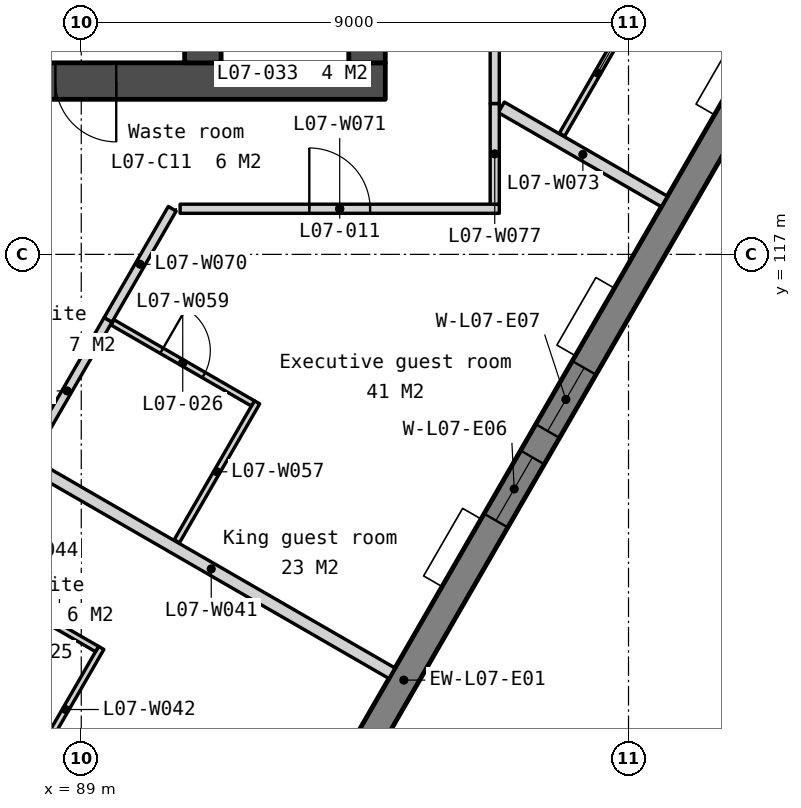
"""IFC4 building model, lengths in metres.
Left out: names, types, materials, properties, quantities, classifications, styles, units other than length and angle.
Written with IfcOpenShell. Run it as: python <this file> out.ifc"""

import sys

from ifc_helpers import new_model, si_unit, direction, frame, frame_2d, origin, place, context, subcontext, project, spatial, polyline, rectangle, outline, extrude, element, fill, save


model = new_model("IFC4")
c1 = context("Model", 3, precision=1e-05, world=origin(), true_north=direction((0.0, 1.0)))
c2 = subcontext(c1, "Body", "Model", "MODEL_VIEW")
j1 = project(units=[si_unit("LENGTHUNIT", "METRE"), si_unit("PLANEANGLEUNIT", "RADIAN")], contexts=[c1])
p1 = place(None, origin())
s1 = spatial("IfcSite", under=j1, at=p1, CompositionType="ELEMENT")
p2 = place(p1, origin())
s2 = spatial("IfcBuilding", under=s1, at=p2, CompositionType="ELEMENT")
p3 = place(p2, frame((0.0, 0.0, 38.5)))
s3 = spatial("IfcBuildingStorey", under=s2, at=p3, CompositionType="ELEMENT", Elevation=38.5)
p4 = place(p3, frame((66.0, 119.85, 0.0), z_axis=(0.0, 0.0, 1.0), x_axis=(1.0, 0.0, 0.0)))
e1 = element("IfcWall", 1, at=p4, inside=s3, PredefinedType="SOLIDWALL", context=c2, shape_type="SweptSolid", body=[
    extrude(rectangle(XDim=28.0, YDim=0.6, at=frame_2d((14.0, 0.0))), origin(), (0.0, 0.0, 1.0), 3.35),
])
p5 = place(p4, frame((6.825, 0.0, 0.0)))
e2 = element("IfcOpeningElement", 2, at=p5, cuts=e1, PredefinedType="OPENING", context=c2, shape_type="SweptSolid", body=[
    extrude(rectangle(XDim=1.8, YDim=2.1, at=frame_2d((0.9, 1.05))), frame((0.0, 0.31, 0.0), z_axis=(0.0, -1.0, 0.0), x_axis=(1.0, 0.0, 0.0)), (0.0, 0.0, 1.0), 0.62),
])
p6 = place(p4, frame((15.85, 0.0, 0.0)))
e3 = element("IfcOpeningElement", 3, at=p6, cuts=e1, PredefinedType="OPENING", context=c2, shape_type="SweptSolid", body=[
    extrude(rectangle(XDim=1.5, YDim=2.1, at=frame_2d((0.75, 1.05))), frame((0.0, 0.31, 0.0), z_axis=(0.0, -1.0, 0.0), x_axis=(1.0, 0.0, 0.0)), (0.0, 0.0, 1.0), 0.62),
])
p7 = place(p4, frame((19.375, 0.0, 0.0)))
e4 = element("IfcOpeningElement", 4, at=p7, cuts=e1, PredefinedType="OPENING", context=c2, shape_type="SweptSolid", body=[
    extrude(rectangle(XDim=1.8, YDim=2.1, at=frame_2d((0.9, 1.05))), frame((0.0, 0.31, 0.0), z_axis=(0.0, -1.0, 0.0), x_axis=(1.0, 0.0, 0.0)), (0.0, 0.0, 1.0), 0.62),
])
p8 = place(p4, frame((4.425, 0.0, 0.0)))
e5 = element("IfcOpeningElement", 5, at=p8, cuts=e1, PredefinedType="OPENING", context=c2, shape_type="SweptSolid", body=[
    extrude(rectangle(XDim=1.0, YDim=2.1, at=frame_2d((0.5, 1.05))), frame((0.0, 0.31, 0.0), z_axis=(0.0, -1.0, 0.0), x_axis=(1.0, 0.0, 0.0)), (0.0, 0.0, 1.0), 0.62),
])
p9 = place(p4, frame((9.783, 0.0, 0.0)))
e6 = element("IfcOpeningElement", 6, at=p9, cuts=e1, PredefinedType="OPENING", context=c2, shape_type="SweptSolid", body=[
    extrude(rectangle(XDim=1.0, YDim=2.1, at=frame_2d((0.5, 1.05))), frame((0.0, 0.31, 0.0), z_axis=(0.0, -1.0, 0.0), x_axis=(1.0, 0.0, 0.0)), (0.0, 0.0, 1.0), 0.62),
])
p10 = place(p4, frame((11.525, 0.0, 0.0)))
e7 = element("IfcOpeningElement", 7, at=p10, cuts=e1, PredefinedType="OPENING", context=c2, shape_type="SweptSolid", body=[
    extrude(rectangle(XDim=1.0, YDim=2.1, at=frame_2d((0.5, 1.05))), frame((0.0, 0.31, 0.0), z_axis=(0.0, -1.0, 0.0), x_axis=(1.0, 0.0, 0.0)), (0.0, 0.0, 1.0), 0.62),
])
p11 = place(p4, frame((13.658, 0.0, 0.0)))
e8 = element("IfcOpeningElement", 8, at=p11, cuts=e1, PredefinedType="OPENING", context=c2, shape_type="SweptSolid", body=[
    extrude(rectangle(XDim=1.0, YDim=2.1, at=frame_2d((0.5, 1.05))), frame((0.0, 0.31, 0.0), z_axis=(0.0, -1.0, 0.0), x_axis=(1.0, 0.0, 0.0)), (0.0, 0.0, 1.0), 0.62),
])
p12 = place(p4, frame((22.575, 0.0, 0.0)))
e9 = element("IfcOpeningElement", 9, at=p12, cuts=e1, PredefinedType="OPENING", context=c2, shape_type="SweptSolid", body=[
    extrude(rectangle(XDim=1.0, YDim=2.1, at=frame_2d((0.5, 1.05))), frame((0.0, 0.31, 0.0), z_axis=(0.0, -1.0, 0.0), x_axis=(1.0, 0.0, 0.0)), (0.0, 0.0, 1.0), 0.62),
])
p13 = place(p3, frame((91.0, 122.25, 0.0), z_axis=(0.0, 0.0, 1.0), x_axis=(0.0, -1.0, 0.0)))
e10 = element("IfcWall", 10, at=p13, inside=s3, PredefinedType="SOLIDWALL", context=c2, shape_type="SweptSolid", body=[
    extrude(rectangle(XDim=2.1, YDim=0.6, at=frame_2d((1.05, 0.0))), origin(), (0.0, 0.0, 1.0), 3.35),
])
p14 = place(p3, frame((93.7, 133.95, 0.0), z_axis=(0.0, 0.0, 1.0), x_axis=(0.0, -1.0, 0.0)))
e11 = element("IfcWall", 11, at=p14, inside=s3, PredefinedType="SOLIDWALL", context=c2, shape_type="SweptSolid", body=[
    extrude(rectangle(XDim=13.8, YDim=0.6, at=frame_2d((6.9, 0.0))), origin(), (0.0, 0.0, 1.0), 3.35),
])
p15 = place(p14, frame((0.6, 0.0, 0.0)))
e12 = element("IfcOpeningElement", 12, at=p15, cuts=e11, PredefinedType="OPENING", context=c2, shape_type="SweptSolid", body=[
    extrude(rectangle(XDim=1.1, YDim=2.1, at=frame_2d((0.55, 1.05))), frame((0.0, 0.31, 0.0), z_axis=(0.0, -1.0, 0.0), x_axis=(1.0, 0.0, 0.0)), (0.0, 0.0, 1.0), 0.62),
])
p16 = place(p14, frame((8.963, 0.0, 0.0)))
e13 = element("IfcOpeningElement", 13, at=p16, cuts=e11, PredefinedType="OPENING", context=c2, shape_type="SweptSolid", body=[
    extrude(rectangle(XDim=1.0, YDim=2.1, at=frame_2d((0.5, 1.05))), frame((0.0, 0.31, 0.0), z_axis=(0.0, -1.0, 0.0), x_axis=(1.0, 0.0, 0.0)), (0.0, 0.0, 1.0), 0.62),
])
p17 = place(p14, frame((11.888, 0.0, 0.0)))
e14 = element("IfcOpeningElement", 14, at=p17, cuts=e11, PredefinedType="OPENING", context=c2, shape_type="SweptSolid", body=[
    extrude(rectangle(XDim=1.0, YDim=2.1, at=frame_2d((0.5, 1.05))), frame((0.0, 0.31, 0.0), z_axis=(0.0, -1.0, 0.0), x_axis=(1.0, 0.0, 0.0)), (0.0, 0.0, 1.0), 0.62),
])
p18 = place(p3, frame((83.105, 90.599, -0.15), z_axis=(0.0, 0.0, 1.0), x_axis=(0.499999201451, 0.866025864826, 0.0)))
e15 = element("IfcWall", 15, at=p18, inside=s3, PredefinedType="SOLIDWALL", context=c2, shape_type="SweptSolid", body=[
    extrude(outline(polyline([(44.8, 0.0), (44.8, 3.5), (0.0, 3.5), (0.0, 0.0), (44.8, 0.0)])), frame((0.0, 0.225, 0.0), z_axis=(0.0, -1.0, 0.0), x_axis=(1.0, 0.0, 0.0)), (0.0, 0.0, 1.0), 0.45),
])
p19 = place(p18, frame((0.722, 0.0, 1.05)))
e16 = element("IfcOpeningElement", 16, at=p19, cuts=e15, PredefinedType="OPENING", context=c2, shape_type="SweptSolid", body=[
    extrude(rectangle(XDim=1.2, YDim=1.5, at=frame_2d((0.6, 0.75))), frame((0.0, 0.235, 0.0), z_axis=(0.0, -1.0, 0.0), x_axis=(1.0, 0.0, 0.0)), (0.0, 0.0, 1.0), 0.47),
])
p20 = place(p18, frame((7.51, 0.0, 1.05)))
e17 = element("IfcOpeningElement", 17, at=p20, cuts=e15, PredefinedType="OPENING", context=c2, shape_type="SweptSolid", body=[
    extrude(rectangle(XDim=1.2, YDim=1.5, at=frame_2d((0.6, 0.75))), frame((0.0, 0.235, 0.0), z_axis=(0.0, -1.0, 0.0), x_axis=(1.0, 0.0, 0.0)), (0.0, 0.0, 1.0), 0.47),
])
p21 = place(p18, frame((9.21, 0.0, 1.05)))
e18 = element("IfcOpeningElement", 18, at=p21, cuts=e15, PredefinedType="OPENING", context=c2, shape_type="SweptSolid", body=[
    extrude(rectangle(XDim=1.2, YDim=1.5, at=frame_2d((0.6, 0.75))), frame((0.0, 0.235, 0.0), z_axis=(0.0, -1.0, 0.0), x_axis=(1.0, 0.0, 0.0)), (0.0, 0.0, 1.0), 0.47),
])
p22 = place(p18, frame((16.47, 0.0, 1.05)))
e19 = element("IfcOpeningElement", 19, at=p22, cuts=e15, PredefinedType="OPENING", context=c2, shape_type="SweptSolid", body=[
    extrude(rectangle(XDim=1.2, YDim=1.5, at=frame_2d((0.6, 0.75))), frame((0.0, 0.235, 0.0), z_axis=(0.0, -1.0, 0.0), x_axis=(1.0, 0.0, 0.0)), (0.0, 0.0, 1.0), 0.47),
])
p23 = place(p18, frame((18.17, 0.0, 1.05)))
e20 = element("IfcOpeningElement", 20, at=p23, cuts=e15, PredefinedType="OPENING", context=c2, shape_type="SweptSolid", body=[
    extrude(rectangle(XDim=1.2, YDim=1.5, at=frame_2d((0.6, 0.75))), frame((0.0, 0.235, 0.0), z_axis=(0.0, -1.0, 0.0), x_axis=(1.0, 0.0, 0.0)), (0.0, 0.0, 1.0), 0.47),
])
p24 = place(p18, frame((25.43, 0.0, 1.05)))
e21 = element("IfcOpeningElement", 21, at=p24, cuts=e15, PredefinedType="OPENING", context=c2, shape_type="SweptSolid", body=[
    extrude(rectangle(XDim=1.2, YDim=1.5, at=frame_2d((0.6, 0.75))), frame((0.0, 0.235, 0.0), z_axis=(0.0, -1.0, 0.0), x_axis=(1.0, 0.0, 0.0)), (0.0, 0.0, 1.0), 0.47),
])
p25 = place(p18, frame((27.13, 0.0, 1.05)))
e22 = element("IfcOpeningElement", 22, at=p25, cuts=e15, PredefinedType="OPENING", context=c2, shape_type="SweptSolid", body=[
    extrude(rectangle(XDim=1.2, YDim=1.5, at=frame_2d((0.6, 0.75))), frame((0.0, 0.235, 0.0), z_axis=(0.0, -1.0, 0.0), x_axis=(1.0, 0.0, 0.0)), (0.0, 0.0, 1.0), 0.47),
])
p26 = place(p18, frame((34.39, 0.0, 1.05)))
e23 = element("IfcOpeningElement", 23, at=p26, cuts=e15, PredefinedType="OPENING", context=c2, shape_type="SweptSolid", body=[
    extrude(rectangle(XDim=1.2, YDim=1.5, at=frame_2d((0.6, 0.75))), frame((0.0, 0.235, 0.0), z_axis=(0.0, -1.0, 0.0), x_axis=(1.0, 0.0, 0.0)), (0.0, 0.0, 1.0), 0.47),
])
p27 = place(p18, frame((36.09, 0.0, 1.05)))
e24 = element("IfcOpeningElement", 24, at=p27, cuts=e15, PredefinedType="OPENING", context=c2, shape_type="SweptSolid", body=[
    extrude(rectangle(XDim=1.2, YDim=1.5, at=frame_2d((0.6, 0.75))), frame((0.0, 0.235, 0.0), z_axis=(0.0, -1.0, 0.0), x_axis=(1.0, 0.0, 0.0)), (0.0, 0.0, 1.0), 0.47),
])
p28 = place(p18, frame((42.878, 0.0, 1.05)))
e25 = element("IfcOpeningElement", 25, at=p28, cuts=e15, PredefinedType="OPENING", context=c2, shape_type="SweptSolid", body=[
    extrude(rectangle(XDim=1.2, YDim=1.5, at=frame_2d((0.6, 0.75))), frame((0.0, 0.235, 0.0), z_axis=(0.0, -1.0, 0.0), x_axis=(1.0, 0.0, 0.0)), (0.0, 0.0, 1.0), 0.47),
])
p29 = place(p3, frame((88.165, 113.543, 0.0), z_axis=(0.0, 0.0, 1.0), x_axis=(0.86603516302, -0.499983096127, 0.0)))
e26 = element("IfcWall", 26, at=p29, inside=s3, PredefinedType="PARTITIONING", context=c2, shape_type="SweptSolid", body=[
    extrude(rectangle(XDim=6.865, YDim=0.2, at=frame_2d((3.433, 0.0))), origin(), (0.0, 0.0, 1.0), 3.35),
])
p30 = place(p3, frame((88.158, 108.501, 0.0), z_axis=(0.0, 0.0, 1.0), x_axis=(0.500032503492, 0.866006637072, 0.0)))
e27 = element("IfcWall", 27, at=p30, inside=s3, PredefinedType="PARTITIONING", context=c2, shape_type="SweptSolid", body=[
    extrude(rectangle(XDim=2.34, YDim=0.1, at=frame_2d((1.17, 0.0))), origin(), (0.0, 0.0, 1.0), 3.35),
])
p31 = place(p3, frame((87.116, 111.746, 0.0), z_axis=(0.0, 0.0, 1.0), x_axis=(0.86604923931, -0.499958713387, 0.0)))
e28 = element("IfcWall", 28, at=p31, inside=s3, PredefinedType="PARTITIONING", context=c2, shape_type="SweptSolid", body=[
    extrude(rectangle(XDim=2.475, YDim=0.1, at=frame_2d((1.237, 0.0))), origin(), (0.0, 0.0, 1.0), 3.35),
])
p32 = place(p31, frame((0.837, 0.0, 0.0)))
e29 = element("IfcOpeningElement", 29, at=p32, cuts=e28, PredefinedType="OPENING", context=c2, shape_type="SweptSolid", body=[
    extrude(rectangle(XDim=0.8, YDim=2.1, at=frame_2d((0.4, 1.05))), frame((0.0, 0.06, 0.0), z_axis=(0.0, -1.0, 0.0), x_axis=(1.0, 0.0, 0.0)), (0.0, 0.0, 1.0), 0.12),
])
p33 = place(p3, frame((88.091, 113.585, 0.0), z_axis=(0.0, 0.0, 1.0), x_axis=(0.50000943426, 0.866019956843, 0.0)))
e30 = element("IfcWall", 30, at=p33, inside=s3, PredefinedType="PARTITIONING", context=c2, shape_type="SweptSolid", body=[
    extrude(rectangle(XDim=2.7, YDim=0.15, at=frame_2d((1.35, 0.0))), origin(), (0.0, 0.0, 1.0), 3.35),
])
p34 = place(p3, frame((90.571, 112.281, 0.0), z_axis=(0.0, 0.0, 1.0), x_axis=(0.500007957085, 0.86602080971, 0.0)))
e31 = element("IfcWall", 31, at=p34, inside=s3, PredefinedType="PARTITIONING", context=c2, shape_type="SweptSolid", body=[
    extrude(rectangle(XDim=2.64, YDim=0.1, at=frame_2d((1.32, 0.0))), origin(), (0.0, 0.0, 1.0), 3.35),
])
p35 = place(p3, frame((89.515, 115.881, 0.0), z_axis=(0.0, 0.0, 1.0), x_axis=(0.86601318911, -0.500021155841, 0.0)))
e32 = element("IfcWall", 32, at=p35, inside=s3, PredefinedType="PARTITIONING", context=c2, shape_type="SweptSolid", body=[
    extrude(rectangle(XDim=2.665, YDim=0.1, at=frame_2d((1.333, 0.0))), origin(), (0.0, 0.0, 1.0), 3.35),
])
p36 = place(p35, frame((0.933, 0.0, 0.0)))
e33 = element("IfcOpeningElement", 33, at=p36, cuts=e32, PredefinedType="OPENING", context=c2, shape_type="SweptSolid", body=[
    extrude(rectangle(XDim=0.8, YDim=2.1, at=frame_2d((0.4, 1.05))), frame((0.0, 0.06, 0.0), z_axis=(0.0, -1.0, 0.0), x_axis=(1.0, 0.0, 0.0)), (0.0, 0.0, 1.0), 0.12),
])
p37 = place(p3, frame((89.441, 115.924, 0.0), z_axis=(0.0, 0.0, 1.0), x_axis=(0.499986337096, 0.866033291922, 0.0)))
e34 = element("IfcWall", 34, at=p37, inside=s3, PredefinedType="PARTITIONING", context=c2, shape_type="SweptSolid", body=[
    extrude(rectangle(XDim=2.109, YDim=0.15, at=frame_2d((1.054, 0.0))), origin(), (0.0, 0.0, 1.0), 3.35),
])
p38 = place(p3, frame((90.626, 117.75, 0.0), z_axis=(0.0, 0.0, 1.0), x_axis=(1.0, 0.0, 0.0)))
e35 = element("IfcWall", 35, at=p38, inside=s3, PredefinedType="PARTITIONING", context=c2, shape_type="SweptSolid", body=[
    extrude(rectangle(XDim=5.249, YDim=0.15, at=frame_2d((2.625, 0.0))), origin(), (0.0, 0.0, 1.0), 3.35),
])
p39 = place(p38, frame((2.125, 0.0, 0.0)))
e36 = element("IfcOpeningElement", 36, at=p39, cuts=e35, PredefinedType="OPENING", context=c2, shape_type="SweptSolid", body=[
    extrude(rectangle(XDim=1.0, YDim=2.1, at=frame_2d((0.5, 1.05))), frame((0.0, 0.085, 0.0), z_axis=(0.0, -1.0, 0.0), x_axis=(1.0, 0.0, 0.0)), (0.0, 0.0, 1.0), 0.17),
])
p40 = place(p3, frame((95.908, 119.418, 0.0), z_axis=(0.0, 0.0, 1.0), x_axis=(0.866051688794, -0.499954470265, 0.0)))
e37 = element("IfcWall", 37, at=p40, inside=s3, PredefinedType="PARTITIONING", context=c2, shape_type="SweptSolid", body=[
    extrude(rectangle(XDim=3.097, YDim=0.2, at=frame_2d((1.548, 0.0))), origin(), (0.0, 0.0, 1.0), 3.35),
])
p41 = place(p3, frame((95.8, 117.825, 0.0), z_axis=(0.0, 0.0, 1.0), x_axis=(0.0, 1.0, 0.0)))
e38 = element("IfcWall", 38, at=p41, inside=s3, PredefinedType="PARTITIONING", context=c2, shape_type="SweptSolid", body=[
    extrude(rectangle(XDim=1.656, YDim=0.15, at=frame_2d((0.828, 0.0))), origin(), (0.0, 0.0, 1.0), 3.35),
])
p42 = place(p3, frame((95.8, 119.481, 0.0), z_axis=(0.0, 0.0, 1.0), x_axis=(0.0, 1.0, 0.0)))
e39 = element("IfcWall", 39, at=p42, inside=s3, PredefinedType="PARTITIONING", context=c2, shape_type="SweptSolid", body=[
    extrude(rectangle(XDim=2.771, YDim=0.15, at=frame_2d((1.386, 0.0))), origin(), (0.0, 0.0, 1.0), 3.35),
])
p43 = place(p3, frame((96.907, 118.969, 0.0), z_axis=(0.0, 0.0, 1.0), x_axis=(0.499999433879, 0.866025730634, 0.0)))
e40 = element("IfcWall", 40, at=p43, inside=s3, PredefinedType="PARTITIONING", context=c2, shape_type="SweptSolid", body=[
    extrude(rectangle(XDim=2.34, YDim=0.1, at=frame_2d((1.17, 0.0))), origin(), (0.0, 0.0, 1.0), 3.35),
])
p44 = place(p12, origin())
e41 = element("IfcDoor", 41, at=p44, inside=s3, OperationType="SINGLE_SWING_RIGHT", PredefinedType="DOOR", context=c2, shape_type="SweptSolid", body=[
    extrude(rectangle(XDim=1.0, YDim=2.1, at=frame_2d((0.5, 1.05))), frame((0.0, 0.025, 0.0), z_axis=(0.0, -1.0, 0.0), x_axis=(1.0, 0.0, 0.0)), (0.0, 0.0, 1.0), 0.05),
])
fill(e9, e41)
p45 = place(p24, origin())
e42 = element("IfcWindow", 42, at=p45, inside=s3, PartitioningType="SINGLE_PANEL", PredefinedType="WINDOW", context=c2, shape_type="SweptSolid", body=[
    extrude(rectangle(XDim=1.2, YDim=1.5, at=frame_2d((0.6, 0.75))), frame((0.0, 0.03, 0.0), z_axis=(0.0, -1.0, 0.0), x_axis=(1.0, 0.0, 0.0)), (0.0, 0.0, 1.0), 0.06),
])
fill(e21, e42)
p46 = place(p25, origin())
e43 = element("IfcWindow", 43, at=p46, inside=s3, PartitioningType="SINGLE_PANEL", PredefinedType="WINDOW", context=c2, shape_type="SweptSolid", body=[
    extrude(rectangle(XDim=1.2, YDim=1.5, at=frame_2d((0.6, 0.75))), frame((0.0, 0.03, 0.0), z_axis=(0.0, -1.0, 0.0), x_axis=(1.0, 0.0, 0.0)), (0.0, 0.0, 1.0), 0.06),
])
fill(e22, e43)
p47 = place(p39, origin())
e44 = element("IfcDoor", 44, at=p47, inside=s3, OperationType="SINGLE_SWING_LEFT", PredefinedType="DOOR", context=c2, shape_type="SweptSolid", body=[
    extrude(rectangle(XDim=1.0, YDim=2.1, at=frame_2d((0.5, 1.05))), frame((0.0, 0.025, 0.0), z_axis=(0.0, -1.0, 0.0), x_axis=(1.0, 0.0, 0.0)), (0.0, 0.0, 1.0), 0.05),
])
fill(e36, e44)
p48 = place(p32, origin())
e45 = element("IfcDoor", 45, at=p48, inside=s3, OperationType="SINGLE_SWING_LEFT", PredefinedType="DOOR", context=c2, shape_type="SweptSolid", body=[
    extrude(rectangle(XDim=0.8, YDim=2.1, at=frame_2d((0.4, 1.05))), frame((0.0, 0.025, 0.0), z_axis=(0.0, -1.0, 0.0), x_axis=(1.0, 0.0, 0.0)), (0.0, 0.0, 1.0), 0.05),
])
fill(e29, e45)
p49 = place(p36, origin())
e46 = element("IfcDoor", 46, at=p49, inside=s3, OperationType="SINGLE_SWING_LEFT", PredefinedType="DOOR", context=c2, shape_type="SweptSolid", body=[
    extrude(rectangle(XDim=0.8, YDim=2.1, at=frame_2d((0.4, 1.05))), frame((0.0, 0.025, 0.0), z_axis=(0.0, -1.0, 0.0), x_axis=(1.0, 0.0, 0.0)), (0.0, 0.0, 1.0), 0.05),
])
fill(e33, e46)
save(model, sys.argv[1])
